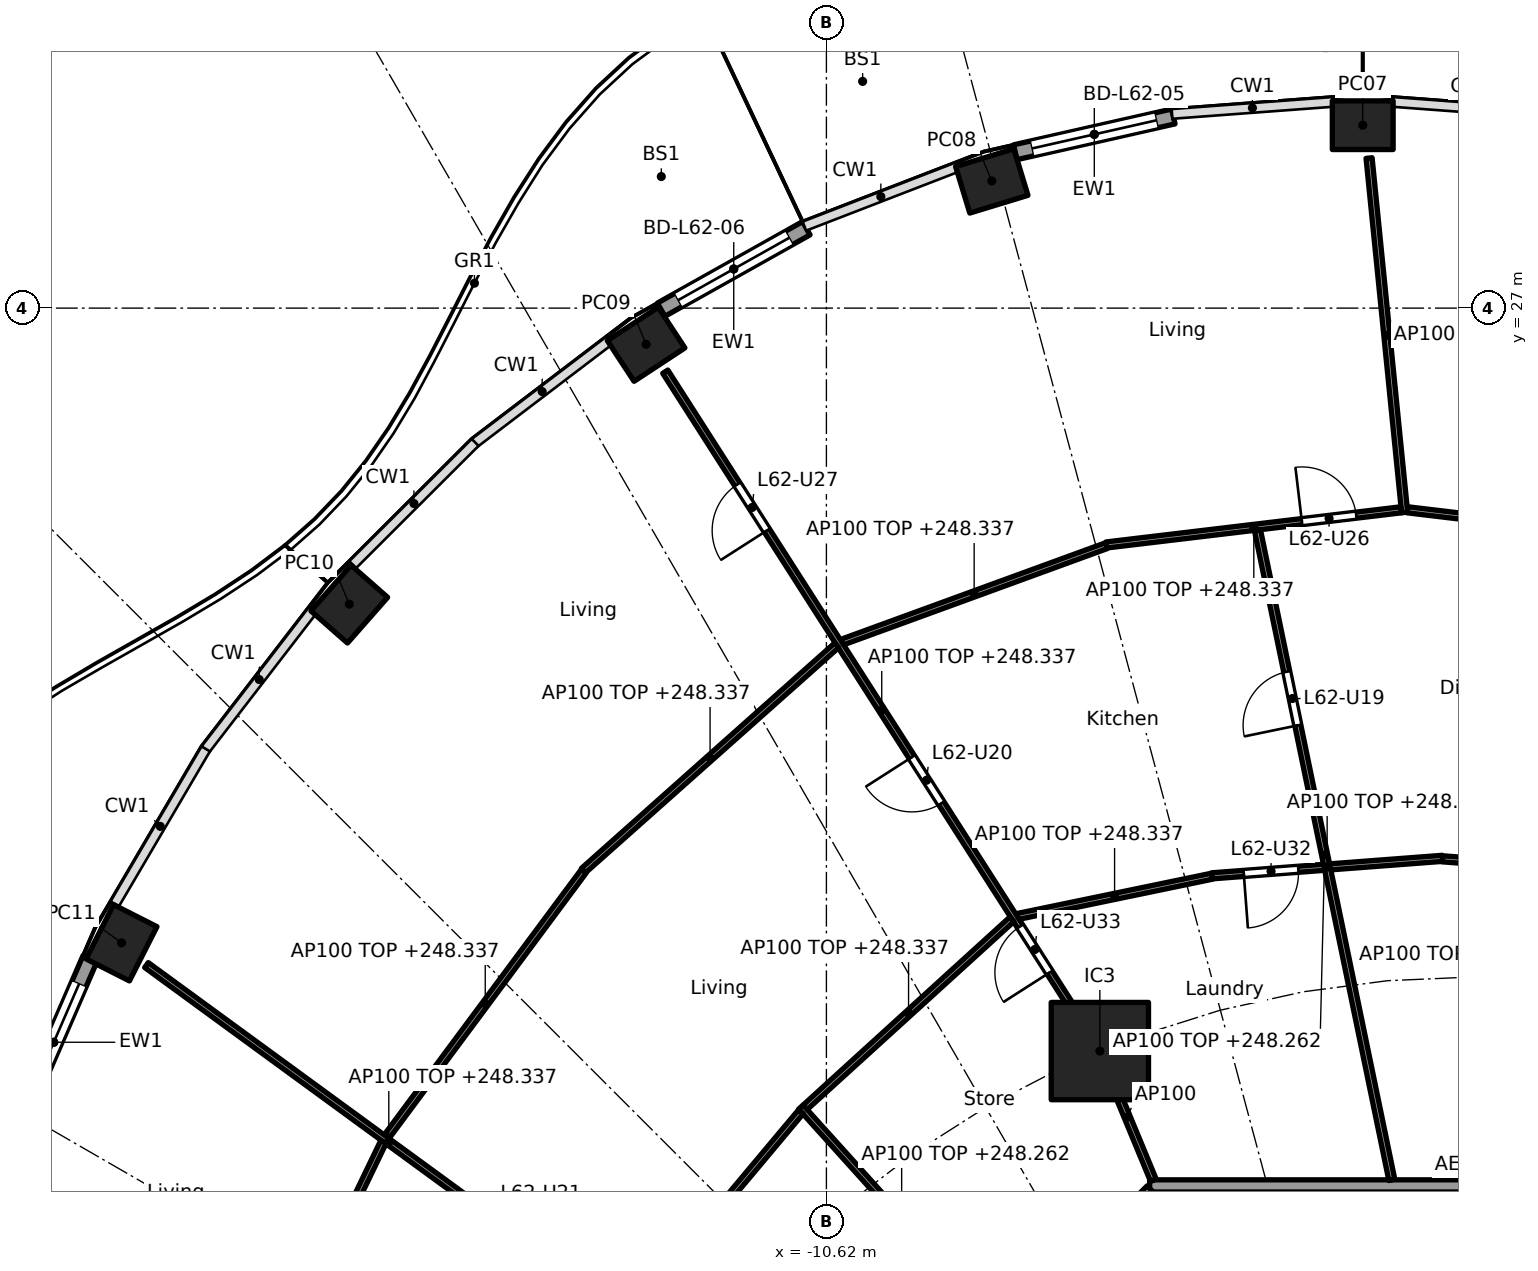
"""IFC4 building model, lengths in metres.
Left out: names, types, materials, properties, quantities, classifications, styles, units other than length and angle.
Written with IfcOpenShell. Run it as: python <this file> out.ifc"""

import sys

from ifc_helpers import new_model, si_unit, direction, frame, frame_2d, origin, origin_2d, place, context, subcontext, project, spatial, rectangle, hollow_rectangle, extrude, element, fill, save


model = new_model("IFC4")
c1 = context("Model", 3, precision=1e-05, world=origin(), true_north=direction((0.0, 1.0)))
c2 = subcontext(c1, "Body", "Model", "MODEL_VIEW")
j1 = project(units=[si_unit("LENGTHUNIT", "METRE"), si_unit("PLANEANGLEUNIT", "RADIAN")], contexts=[c1])
p1 = place(None, origin())
s1 = spatial("IfcSite", under=j1, at=p1, CompositionType="ELEMENT")
p2 = place(p1, origin())
s2 = spatial("IfcBuilding", under=s1, at=p2, CompositionType="ELEMENT")
p3 = place(p2, frame((0.0, 0.0, 245.5)))
s3 = spatial("IfcBuildingStorey", under=s2, at=p3, CompositionType="ELEMENT", Elevation=245.5)
for number, where, z_axis, x_axis in (
    (1, (-1.8, 30.008, 0.0), (0.0, 0.0, 1.0), (-1.0, 0.0, 0.0)),
    (2, (-7.9, 29.092, 0.0), (0.0, 0.0, 1.0), (-0.957, -0.292, 0.0)),
    (3, (-13.585, 26.405, 0.0), (0.0, 0.0, 1.0), (-0.836, -0.549, 0.0)),
    (4, (-18.467, 22.132, 0.0), (0.0, 0.0, 1.0), (-0.66, -0.751, 0.0)),
    (5, (-22.212, 16.563, 0.0), (0.0, 0.0, 1.0), (-0.452, -0.892, 0.0)),
):
    element("IfcColumn", number, at=place(p3, frame(where, z_axis=z_axis, x_axis=x_axis)), inside=s3, PredefinedType="COLUMN", context=c2, shape_type="SweptSolid", body=[
        extrude(hollow_rectangle(XDim=1.0, YDim=0.8, WallThickness=0.032, at=origin_2d()), origin(), (0.0, 0.0, 1.0), 3.7),
    ])
p4 = place(p3, frame((-6.123, 14.782, 0.0), z_axis=(0.0, 0.0, 1.0), x_axis=(1.0, 0.0, 0.0)))
e6 = element("IfcColumn", 6, at=p4, inside=s3, PredefinedType="COLUMN", context=c2, shape_type="SweptSolid", body=[
    extrude(rectangle(XDim=1.6, YDim=1.6, at=origin_2d()), origin(), (0.0, 0.0, 1.0), 3.7),
])
p5 = place(p3, frame((-7.514, 29.563, 0.0), z_axis=(0.0, 0.0, 1.0), x_axis=(0.975324089124, 0.220777990694, 0.0)))
e7 = element("IfcWall", 7, at=p5, inside=s3, PredefinedType="SOLIDWALL", context=c2, shape_type="SweptSolid", body=[
    extrude(rectangle(XDim=2.666, YDim=0.25, at=frame_2d((1.333, 0.0))), origin(), (0.0, 0.0, 1.0), 3.44),
])
p6 = place(p5, frame((0.283, 0.0, 0.0)))
e8 = element("IfcOpeningElement", 8, at=p6, cuts=e7, PredefinedType="OPENING", context=c2, shape_type="SweptSolid", body=[
    extrude(rectangle(XDim=2.1, YDim=2.4, at=frame_2d((1.05, 1.2))), frame((0.0, 0.135, 0.0), z_axis=(0.0, -1.0, 0.0), x_axis=(1.0, 0.0, 0.0)), (0.0, 0.0, 1.0), 0.27),
])
p7 = place(p3, frame((-13.338, 26.974, 0.0), z_axis=(0.0, 0.0, 1.0), x_axis=(0.872101280701, 0.489325409313, 0.0)))
e9 = element("IfcWall", 9, at=p7, inside=s3, PredefinedType="SOLIDWALL", context=c2, shape_type="SweptSolid", body=[
    extrude(rectangle(XDim=2.738, YDim=0.25, at=frame_2d((1.369, 0.0))), origin(), (0.0, 0.0, 1.0), 3.44),
])
p8 = place(p7, frame((0.319, 0.0, 0.0)))
e10 = element("IfcOpeningElement", 10, at=p8, cuts=e9, PredefinedType="OPENING", context=c2, shape_type="SweptSolid", body=[
    extrude(rectangle(XDim=2.1, YDim=2.4, at=frame_2d((1.05, 1.2))), frame((0.0, 0.135, 0.0), z_axis=(0.0, -1.0, 0.0), x_axis=(1.0, 0.0, 0.0)), (0.0, 0.0, 1.0), 0.27),
])
p9 = place(p3, frame((-23.923, 13.55, 0.0), z_axis=(0.0, 0.0, 1.0), x_axis=(0.397685034628, 0.917521996048, 0.0)))
e11 = element("IfcWall", 11, at=p9, inside=s3, PredefinedType="SOLIDWALL", context=c2, shape_type="SweptSolid", body=[
    extrude(rectangle(XDim=3.002, YDim=0.25, at=frame_2d((1.501, 0.0))), origin(), (0.0, 0.0, 1.0), 3.44),
])
p10 = place(p9, frame((0.451, 0.0, 0.0)))
e12 = element("IfcOpeningElement", 12, at=p10, cuts=e11, PredefinedType="OPENING", context=c2, shape_type="SweptSolid", body=[
    extrude(rectangle(XDim=2.1, YDim=2.4, at=frame_2d((1.05, 1.2))), frame((0.0, 0.135, 0.0), z_axis=(0.0, -1.0, 0.0), x_axis=(1.0, 0.0, 0.0)), (0.0, 0.0, 1.0), 0.27),
])
p11 = place(p3, frame((5.104, 12.565, 0.0), z_axis=(0.0, 0.0, 1.0), x_axis=(-1.0, 0.0, 0.0)))
e13 = element("IfcWall", 13, at=p11, inside=s3, PredefinedType="PARTITIONING", context=c2, shape_type="SweptSolid", body=[
    extrude(rectangle(XDim=10.409, YDim=0.2, at=frame_2d((5.205, 0.0))), origin(), (0.0, 0.0, 1.0), 3.44),
])
p12 = place(p3, frame((-5.275, 12.494, 0.0), z_axis=(0.0, 0.0, 1.0), x_axis=(-0.707106781187, -0.707106781187, 0.0)))
e14 = element("IfcWall", 14, at=p12, inside=s3, PredefinedType="PARTITIONING", context=c2, shape_type="SweptSolid", body=[
    extrude(rectangle(XDim=10.209, YDim=0.2, at=frame_2d((5.104, 0.0))), origin(), (0.0, 0.0, 1.0), 3.44),
])
p13 = place(p3, frame((3.101, 17.671, 0.0), z_axis=(0.0, 0.0, 1.0), x_axis=(-0.997133705575, 0.075659587668, 0.0)))
e15 = element("IfcWall", 15, at=p13, inside=s3, PredefinedType="PARTITIONING", context=c2, shape_type="SweptSolid", body=[
    extrude(rectangle(XDim=3.601, YDim=0.1, at=frame_2d((1.801, 0.0))), origin(), (0.0, 0.0, 1.0), 2.837),
])
p14 = place(p13, frame((1.351, 0.0, 0.0)))
e16 = element("IfcOpeningElement", 16, at=p14, cuts=e15, PredefinedType="OPENING", context=c2, shape_type="SweptSolid", body=[
    extrude(rectangle(XDim=0.9, YDim=2.1, at=frame_2d((0.45, 1.05))), frame((0.0, 0.06, 0.0), z_axis=(0.0, -1.0, 0.0), x_axis=(1.0, 0.0, 0.0)), (0.0, 0.0, 1.0), 0.12),
])
p15 = place(p3, frame((3.686, 23.117, 0.0), z_axis=(0.0, 0.0, 1.0), x_axis=(-0.992965872314, 0.11840091393, 0.0)))
e17 = element("IfcWall", 17, at=p15, inside=s3, PredefinedType="PARTITIONING", context=c2, shape_type="SweptSolid", body=[
    extrude(rectangle(XDim=4.786, YDim=0.1, at=frame_2d((2.393, 0.0))), origin(), (0.0, 0.0, 1.0), 2.837),
])
p16 = place(p3, frame((-0.49, 17.951, 0.0), z_axis=(0.0, 0.0, 1.0), x_axis=(-0.99713329702, -0.075664971907, 0.0)))
e18 = element("IfcWall", 18, at=p16, inside=s3, PredefinedType="PARTITIONING", context=c2, shape_type="SweptSolid", body=[
    extrude(rectangle(XDim=3.801, YDim=0.1, at=frame_2d((1.9, 0.0))), origin(), (0.0, 0.0, 1.0), 2.837),
])
p17 = place(p16, frame((2.376, 0.0, 0.0)))
e19 = element("IfcOpeningElement", 19, at=p17, cuts=e18, PredefinedType="OPENING", context=c2, shape_type="SweptSolid", body=[
    extrude(rectangle(XDim=0.9, YDim=2.1, at=frame_2d((0.45, 1.05))), frame((0.0, 0.06, 0.0), z_axis=(0.0, -1.0, 0.0), x_axis=(1.0, 0.0, 0.0)), (0.0, 0.0, 1.0), 0.12),
])
p18 = place(p3, frame((-1.111, 23.64, 0.0), z_axis=(0.0, 0.0, 1.0), x_axis=(-0.099784339691, 0.995009088176, 0.0)))
e20 = element("IfcWall", 20, at=p18, inside=s3, PredefinedType="PARTITIONING", context=c2, shape_type="SweptSolid", body=[
    extrude(rectangle(XDim=5.857, YDim=0.1, at=frame_2d((2.929, 0.0))), origin(), (0.0, 0.0, 1.0), 2.837),
])
p19 = place(p3, frame((-1.166, 23.683, 0.0), z_axis=(0.0, 0.0, 1.0), x_axis=(-0.992961712415, -0.118435795593, 0.0)))
e21 = element("IfcWall", 21, at=p19, inside=s3, PredefinedType="PARTITIONING", context=c2, shape_type="SweptSolid", body=[
    extrude(rectangle(XDim=4.885, YDim=0.1, at=frame_2d((2.443, 0.0))), origin(), (0.0, 0.0, 1.0), 2.837),
])
p20 = place(p19, frame((0.746, 0.0, 0.0)))
e22 = element("IfcOpeningElement", 22, at=p20, cuts=e21, PredefinedType="OPENING", context=c2, shape_type="SweptSolid", body=[
    extrude(rectangle(XDim=0.9, YDim=2.1, at=frame_2d((0.45, 1.05))), frame((0.0, 0.06, 0.0), z_axis=(0.0, -1.0, 0.0), x_axis=(1.0, 0.0, 0.0)), (0.0, 0.0, 1.0), 0.12),
])
p21 = place(p3, frame((-1.321, 12.663, 0.0), z_axis=(0.0, 0.0, 1.0), x_axis=(-0.202499831859, 0.979282297449, 0.0)))
e23 = element("IfcWall", 23, at=p21, inside=s3, PredefinedType="PARTITIONING", context=c2, shape_type="SweptSolid", body=[
    extrude(rectangle(XDim=10.915, YDim=0.1, at=frame_2d((5.457, 0.0))), origin(), (0.0, 0.0, 1.0), 2.762),
])
p22 = place(p21, frame((7.634, 0.0, 0.0)))
e24 = element("IfcOpeningElement", 24, at=p22, cuts=e23, PredefinedType="OPENING", context=c2, shape_type="SweptSolid", body=[
    extrude(rectangle(XDim=0.9, YDim=2.1, at=frame_2d((0.45, 1.05))), frame((0.0, 0.06, 0.0), z_axis=(0.0, -1.0, 0.0), x_axis=(1.0, 0.0, 0.0)), (0.0, 0.0, 1.0), 0.12),
])
p23 = place(p3, frame((-4.28, 17.657, 0.0), z_axis=(0.0, 0.0, 1.0), x_axis=(-0.979205232861, -0.202872156637, 0.0)))
e25 = element("IfcWall", 25, at=p23, inside=s3, PredefinedType="PARTITIONING", context=c2, shape_type="SweptSolid", body=[
    extrude(rectangle(XDim=3.271, YDim=0.1, at=frame_2d((1.635, 0.0))), origin(), (0.0, 0.0, 1.0), 2.837),
])
p24 = place(p3, frame((-6.014, 23.094, 0.0), z_axis=(0.0, 0.0, 1.0), x_axis=(-0.939417400947, -0.342775359089, 0.0)))
e26 = element("IfcWall", 26, at=p24, inside=s3, PredefinedType="PARTITIONING", context=c2, shape_type="SweptSolid", body=[
    extrude(rectangle(XDim=4.633, YDim=0.1, at=frame_2d((2.316, 0.0))), origin(), (0.0, 0.0, 1.0), 2.837),
])
p25 = place(p3, frame((-5.243, 12.657, 0.0), z_axis=(0.0, 0.0, 1.0), x_axis=(-0.382757529444, 0.923848837015, 0.0)))
e27 = element("IfcWall", 27, at=p25, inside=s3, PredefinedType="PARTITIONING", context=c2, shape_type="SweptSolid", body=[
    extrude(rectangle(XDim=2.25, YDim=0.1, at=frame_2d((1.125, 0.0))), origin(), (0.0, 0.0, 1.0), 3.44),
])
p26 = place(p3, frame((-6.15, 14.824, 0.0), z_axis=(0.0, 0.0, 1.0), x_axis=(-0.538870687577, 0.842388498301, 0.0)))
e28 = element("IfcWall", 28, at=p26, inside=s3, PredefinedType="PARTITIONING", context=c2, shape_type="SweptSolid", body=[
    extrude(rectangle(XDim=13.213, YDim=0.1, at=frame_2d((6.606, 0.0))), origin(), (0.0, 0.0, 1.0), 2.837),
])
p27 = place(p26, frame((4.787, 0.0, 0.0)))
e29 = element("IfcOpeningElement", 29, at=p27, cuts=e28, PredefinedType="OPENING", context=c2, shape_type="SweptSolid", body=[
    extrude(rectangle(XDim=0.9, YDim=2.1, at=frame_2d((0.45, 1.05))), frame((0.0, 0.06, 0.0), z_axis=(0.0, -1.0, 0.0), x_axis=(1.0, 0.0, 0.0)), (0.0, 0.0, 1.0), 0.12),
])
p28 = place(p26, frame((10.112, 0.0, 0.0)))
e30 = element("IfcOpeningElement", 30, at=p28, cuts=e28, PredefinedType="OPENING", context=c2, shape_type="SweptSolid", body=[
    extrude(rectangle(XDim=0.9, YDim=2.1, at=frame_2d((0.45, 1.05))), frame((0.0, 0.06, 0.0), z_axis=(0.0, -1.0, 0.0), x_axis=(1.0, 0.0, 0.0)), (0.0, 0.0, 1.0), 0.12),
])
p29 = place(p26, frame((1.483, 0.0, 0.0)))
e31 = element("IfcOpeningElement", 31, at=p29, cuts=e28, PredefinedType="OPENING", context=c2, shape_type="SweptSolid", body=[
    extrude(rectangle(XDim=0.9, YDim=2.1, at=frame_2d((0.45, 1.05))), frame((0.0, 0.06, 0.0), z_axis=(0.0, -1.0, 0.0), x_axis=(1.0, 0.0, 0.0)), (0.0, 0.0, 1.0), 0.12),
])
p30 = place(p3, frame((-7.568, 16.95, 0.0), z_axis=(0.0, 0.0, 1.0), x_axis=(-0.739848749506, -0.672773236577, 0.0)))
e32 = element("IfcWall", 32, at=p30, inside=s3, PredefinedType="PARTITIONING", context=c2, shape_type="SweptSolid", body=[
    extrude(rectangle(XDim=4.597, YDim=0.1, at=frame_2d((2.299, 0.0))), origin(), (0.0, 0.0, 1.0), 2.837),
])
p31 = place(p3, frame((-10.45, 21.455, 0.0), z_axis=(0.0, 0.0, 1.0), x_axis=(-0.747155565726, -0.664649201162, 0.0)))
e33 = element("IfcWall", 33, at=p31, inside=s3, PredefinedType="PARTITIONING", context=c2, shape_type="SweptSolid", body=[
    extrude(rectangle(XDim=5.575, YDim=0.1, at=frame_2d((2.788, 0.0))), origin(), (0.0, 0.0, 1.0), 2.837),
])
p32 = place(p3, frame((-7.725, 10.186, 0.0), z_axis=(0.0, 0.0, 1.0), x_axis=(-0.669817301526, 0.742525947409, 0.0)))
e34 = element("IfcWall", 34, at=p32, inside=s3, PredefinedType="PARTITIONING", context=c2, shape_type="SweptSolid", body=[
    extrude(rectangle(XDim=4.949, YDim=0.1, at=frame_2d((2.475, 0.0))), origin(), (0.0, 0.0, 1.0), 2.762),
])
p33 = place(p3, frame((-11.039, 13.785, 0.0), z_axis=(0.0, 0.0, 1.0), x_axis=(-0.642258090087, -0.766488451131, 0.0)))
e35 = element("IfcWall", 35, at=p33, inside=s3, PredefinedType="PARTITIONING", context=c2, shape_type="SweptSolid", body=[
    extrude(rectangle(XDim=4.361, YDim=0.1, at=frame_2d((2.18, 0.0))), origin(), (0.0, 0.0, 1.0), 2.837),
])
p34 = place(p3, frame((-14.608, 17.743, 0.0), z_axis=(0.0, 0.0, 1.0), x_axis=(-0.596174489482, -0.8028548923, 0.0)))
e36 = element("IfcWall", 36, at=p34, inside=s3, PredefinedType="PARTITIONING", context=c2, shape_type="SweptSolid", body=[
    extrude(rectangle(XDim=5.442, YDim=0.1, at=frame_2d((2.721, 0.0))), origin(), (0.0, 0.0, 1.0), 2.837),
])
p35 = place(p3, frame((-13.831, 10.375, 0.0), z_axis=(0.0, 0.0, 1.0), x_axis=(-0.807534306161, 0.589820603551, 0.0)))
e37 = element("IfcWall", 37, at=p35, inside=s3, PredefinedType="PARTITIONING", context=c2, shape_type="SweptSolid", body=[
    extrude(rectangle(XDim=9.87, YDim=0.1, at=frame_2d((4.935, 0.0))), origin(), (0.0, 0.0, 1.0), 2.837),
])
p36 = place(p35, frame((2.083, 0.0, 0.0)))
e38 = element("IfcOpeningElement", 38, at=p36, cuts=e37, PredefinedType="OPENING", context=c2, shape_type="SweptSolid", body=[
    extrude(rectangle(XDim=0.9, YDim=2.1, at=frame_2d((0.45, 1.05))), frame((0.0, 0.06, 0.0), z_axis=(0.0, -1.0, 0.0), x_axis=(1.0, 0.0, 0.0)), (0.0, 0.0, 1.0), 0.12),
])
p37 = place(p3, frame((-17.904, 13.289, 0.0), z_axis=(0.0, 0.0, 1.0), x_axis=(-0.434292070406, -0.900772111903, 0.0)))
e39 = element("IfcWall", 39, at=p37, inside=s3, PredefinedType="PARTITIONING", context=c2, shape_type="SweptSolid", body=[
    extrude(rectangle(XDim=5.469, YDim=0.1, at=frame_2d((2.734, 0.0))), origin(), (0.0, 0.0, 1.0), 2.837),
])
p38 = place(p6, origin())
e40 = element("IfcDoor", 40, at=p38, inside=s3, OperationType="SLIDING_TO_LEFT", PredefinedType="DOOR", context=c2, shape_type="SweptSolid", body=[
    extrude(rectangle(XDim=2.1, YDim=2.4, at=frame_2d((1.05, 1.2))), frame((0.0, 0.025, 0.0), z_axis=(0.0, -1.0, 0.0), x_axis=(1.0, 0.0, 0.0)), (0.0, 0.0, 1.0), 0.05),
])
fill(e8, e40)
p39 = place(p8, origin())
e41 = element("IfcDoor", 41, at=p39, inside=s3, OperationType="SLIDING_TO_LEFT", PredefinedType="DOOR", context=c2, shape_type="SweptSolid", body=[
    extrude(rectangle(XDim=2.1, YDim=2.4, at=frame_2d((1.05, 1.2))), frame((0.0, 0.025, 0.0), z_axis=(0.0, -1.0, 0.0), x_axis=(1.0, 0.0, 0.0)), (0.0, 0.0, 1.0), 0.05),
])
fill(e10, e41)
p40 = place(p10, origin())
e42 = element("IfcDoor", 42, at=p40, inside=s3, OperationType="SLIDING_TO_LEFT", PredefinedType="DOOR", context=c2, shape_type="SweptSolid", body=[
    extrude(rectangle(XDim=2.1, YDim=2.4, at=frame_2d((1.05, 1.2))), frame((0.0, 0.025, 0.0), z_axis=(0.0, -1.0, 0.0), x_axis=(1.0, 0.0, 0.0)), (0.0, 0.0, 1.0), 0.05),
])
fill(e12, e42)
p41 = place(p22, origin())
e43 = element("IfcDoor", 43, at=p41, inside=s3, OperationType="SINGLE_SWING_LEFT", PredefinedType="DOOR", context=c2, shape_type="SweptSolid", body=[
    extrude(rectangle(XDim=0.9, YDim=2.1, at=frame_2d((0.45, 1.05))), frame((0.0, 0.025, 0.0), z_axis=(0.0, -1.0, 0.0), x_axis=(1.0, 0.0, 0.0)), (0.0, 0.0, 1.0), 0.05),
])
fill(e24, e43)
p42 = place(p27, origin())
e44 = element("IfcDoor", 44, at=p42, inside=s3, OperationType="SINGLE_SWING_RIGHT", PredefinedType="DOOR", context=c2, shape_type="SweptSolid", body=[
    extrude(rectangle(XDim=0.9, YDim=2.1, at=frame_2d((0.45, 1.05))), frame((0.0, 0.025, 0.0), z_axis=(0.0, -1.0, 0.0), x_axis=(1.0, 0.0, 0.0)), (0.0, 0.0, 1.0), 0.05),
])
fill(e29, e44)
p43 = place(p20, frame((0.9, 0.0, 0.0), x_axis=(-1.0, 0.0, 0.0)))
e45 = element("IfcDoor", 45, at=p43, inside=s3, OperationType="SINGLE_SWING_LEFT", PredefinedType="DOOR", context=c2, shape_type="SweptSolid", body=[
    extrude(rectangle(XDim=0.9, YDim=2.1, at=frame_2d((0.45, 1.05))), frame((0.0, 0.025, 0.0), z_axis=(0.0, -1.0, 0.0), x_axis=(1.0, 0.0, 0.0)), (0.0, 0.0, 1.0), 0.05),
])
fill(e22, e45)
p44 = place(p28, origin())
e46 = element("IfcDoor", 46, at=p44, inside=s3, OperationType="SINGLE_SWING_LEFT", PredefinedType="DOOR", context=c2, shape_type="SweptSolid", body=[
    extrude(rectangle(XDim=0.9, YDim=2.1, at=frame_2d((0.45, 1.05))), frame((0.0, 0.025, 0.0), z_axis=(0.0, -1.0, 0.0), x_axis=(1.0, 0.0, 0.0)), (0.0, 0.0, 1.0), 0.05),
])
fill(e30, e46)
p45 = place(p17, origin())
e47 = element("IfcDoor", 47, at=p45, inside=s3, OperationType="SINGLE_SWING_RIGHT", PredefinedType="DOOR", context=c2, shape_type="SweptSolid", body=[
    extrude(rectangle(XDim=0.9, YDim=2.1, at=frame_2d((0.45, 1.05))), frame((0.0, 0.025, 0.0), z_axis=(0.0, -1.0, 0.0), x_axis=(1.0, 0.0, 0.0)), (0.0, 0.0, 1.0), 0.05),
])
fill(e19, e47)
p46 = place(p29, origin())
e48 = element("IfcDoor", 48, at=p46, inside=s3, OperationType="SINGLE_SWING_LEFT", PredefinedType="DOOR", context=c2, shape_type="SweptSolid", body=[
    extrude(rectangle(XDim=0.9, YDim=2.1, at=frame_2d((0.45, 1.05))), frame((0.0, 0.025, 0.0), z_axis=(0.0, -1.0, 0.0), x_axis=(1.0, 0.0, 0.0)), (0.0, 0.0, 1.0), 0.05),
])
fill(e31, e48)
save(model, sys.argv[1])
